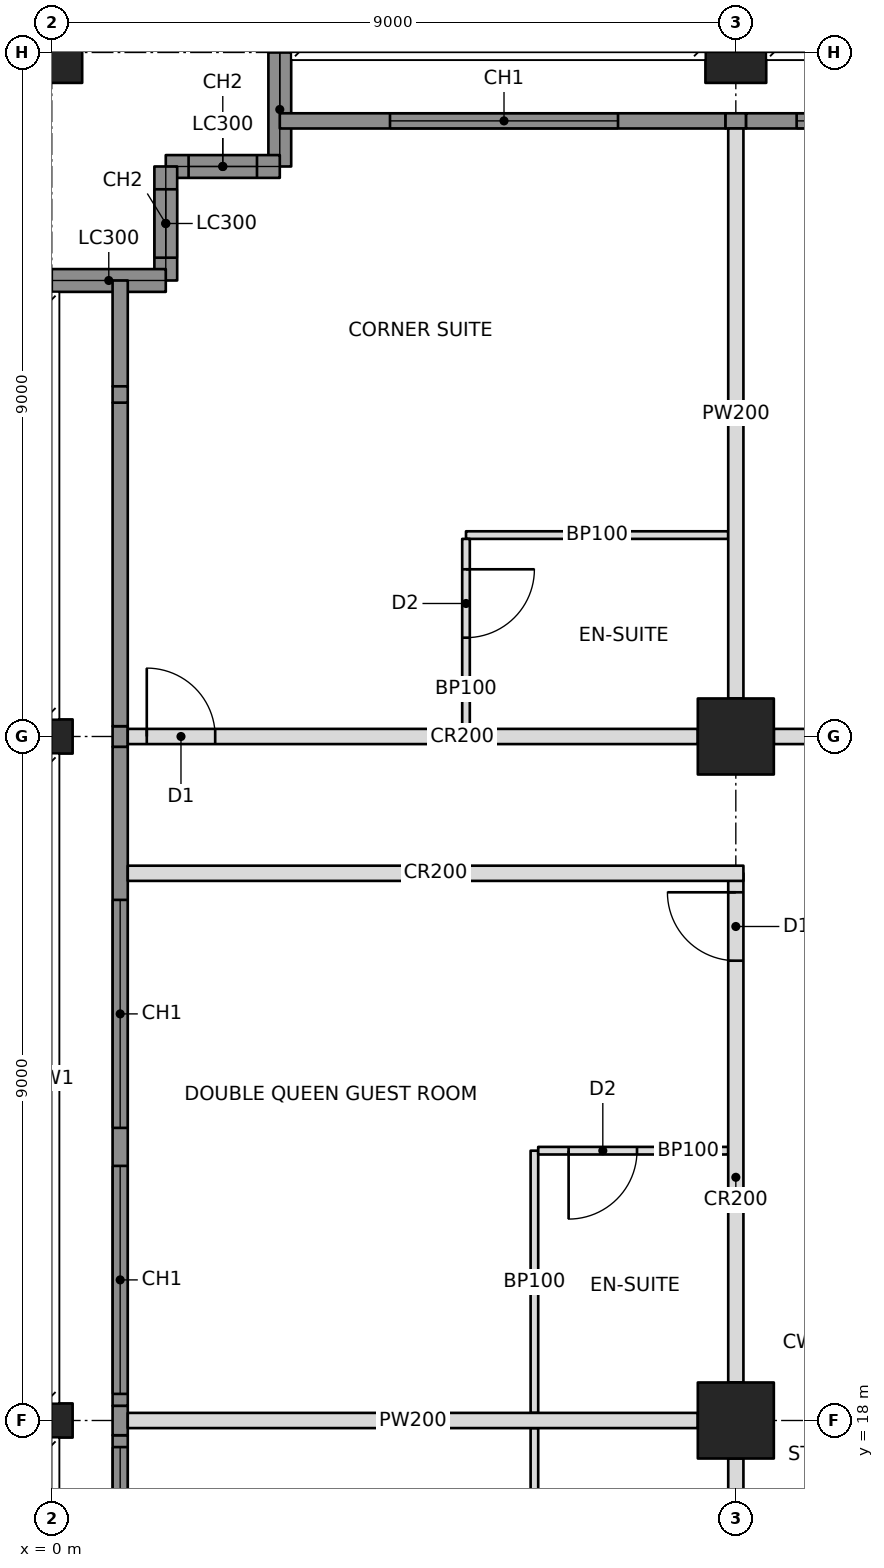
"""IFC4 building model, lengths in metres.
Left out: names, types, materials, properties, quantities, classifications, styles, units other than length and angle.
Written with IfcOpenShell. Run it as: python <this file> out.ifc"""

import sys

from ifc_helpers import new_model, si_unit, direction, frame, frame_2d, origin, origin_2d, place, context, subcontext, project, spatial, rectangle, hollow_rectangle, i_section, extrude, element, fill, save


model = new_model("IFC4")
c1 = context("Model", 3, precision=1e-05, world=origin(), true_north=direction((0.0, 1.0)))
c2 = subcontext(c1, "Body", "Model", "MODEL_VIEW")
j1 = project(units=[si_unit("LENGTHUNIT", "METRE"), si_unit("PLANEANGLEUNIT", "RADIAN")], contexts=[c1])
p1 = place(None, origin())
s1 = spatial("IfcSite", under=j1, at=p1, CompositionType="ELEMENT")
p2 = place(p1, origin())
s2 = spatial("IfcBuilding", under=s1, at=p2, CompositionType="ELEMENT")
p3 = place(p2, frame((0.0, 0.0, 94.2)))
s3 = spatial("IfcBuildingStorey", under=s2, at=p3, CompositionType="ELEMENT", Elevation=94.2)
for number, where, z_axis, x_axis in (
    (1, (0.0, 18.0, 0.0), (0.0, 0.0, 1.0), (0.0, 1.0, 0.0)),
    (2, (0.0, 27.0, 0.0), (0.0, 0.0, 1.0), (0.0, 1.0, 0.0)),
):
    element("IfcColumn", number, at=place(p3, frame(where, z_axis=z_axis, x_axis=x_axis)), inside=s3, PredefinedType="COLUMN", context=c2, shape_type="SweptSolid", body=[
        extrude(i_section(OverallWidth=0.449, OverallDepth=0.549, WebThickness=0.072, FlangeThickness=0.115, at=origin_2d()), origin(), (0.0, 0.0, 1.0), 3.4),
    ])
p4 = place(p3, frame((0.0, 36.0, 0.0), z_axis=(0.0, 0.0, 1.0), x_axis=(1.0, 0.0, 0.0)))
e3 = element("IfcColumn", 3, at=p4, inside=s3, PredefinedType="COLUMN", context=c2, shape_type="SweptSolid", body=[
    extrude(hollow_rectangle(XDim=0.8, YDim=0.8, WallThickness=0.07, at=origin_2d()), origin(), (0.0, 0.0, 1.0), 3.4),
])
for number, where, z_axis, x_axis in (
    (4, (9.0, 18.0, 0.0), (0.0, 0.0, 1.0), (1.0, 0.0, 0.0)),
    (5, (9.0, 27.0, 0.0), (0.0, 0.0, 1.0), (1.0, 0.0, 0.0)),
):
    element("IfcColumn", number, at=place(p3, frame(where, z_axis=z_axis, x_axis=x_axis)), inside=s3, PredefinedType="COLUMN", context=c2, shape_type="SweptSolid", body=[
        extrude(hollow_rectangle(XDim=1.0, YDim=1.0, WallThickness=0.1, at=origin_2d()), origin(), (0.0, 0.0, 1.0), 3.4),
    ])
p5 = place(p3, frame((9.0, 36.0, 0.0), z_axis=(0.0, 0.0, 1.0), x_axis=(1.0, 0.0, 0.0)))
e6 = element("IfcColumn", 6, at=p5, inside=s3, PredefinedType="COLUMN", context=c2, shape_type="SweptSolid", body=[
    extrude(hollow_rectangle(XDim=0.8, YDim=0.8, WallThickness=0.07, at=origin_2d()), origin(), (0.0, 0.0, 1.0), 3.4),
])
p6 = place(p3, frame((3.0, 36.0, 0.0), z_axis=(0.0, 0.0, 1.0), x_axis=(0.0, -1.0, 0.0)))
e7 = element("IfcWall", 7, at=p6, inside=s3, PredefinedType="SOLIDWALL", context=c2, shape_type="SweptSolid", body=[
    extrude(rectangle(XDim=1.5, YDim=0.3, at=frame_2d((0.75, 0.0))), origin(), (0.0, 0.0, 1.0), 2.42),
])
p7 = place(p3, frame((3.0, 34.5, 0.0), z_axis=(0.0, 0.0, 1.0), x_axis=(-1.0, 0.0, 0.0)))
e8 = element("IfcWall", 8, at=p7, inside=s3, PredefinedType="SOLIDWALL", context=c2, shape_type="SweptSolid", body=[
    extrude(rectangle(XDim=1.5, YDim=0.3, at=frame_2d((0.75, 0.0))), origin(), (0.0, 0.0, 1.0), 3.2),
])
p8 = place(p7, frame((0.3, 0.0, 0.6)))
e9 = element("IfcOpeningElement", 9, at=p8, cuts=e8, PredefinedType="OPENING", context=c2, shape_type="SweptSolid", body=[
    extrude(rectangle(XDim=0.9, YDim=2.2, at=frame_2d((0.45, 1.1))), frame((0.0, 0.16, 0.0), z_axis=(0.0, -1.0, 0.0), x_axis=(1.0, 0.0, 0.0)), (0.0, 0.0, 1.0), 0.32),
])
p9 = place(p3, frame((1.5, 34.5, 0.0), z_axis=(0.0, 0.0, 1.0), x_axis=(0.0, -1.0, 0.0)))
e10 = element("IfcWall", 10, at=p9, inside=s3, PredefinedType="SOLIDWALL", context=c2, shape_type="SweptSolid", body=[
    extrude(rectangle(XDim=1.5, YDim=0.3, at=frame_2d((0.75, 0.0))), origin(), (0.0, 0.0, 1.0), 3.2),
])
p10 = place(p9, frame((0.3, 0.0, 0.6)))
e11 = element("IfcOpeningElement", 11, at=p10, cuts=e10, PredefinedType="OPENING", context=c2, shape_type="SweptSolid", body=[
    extrude(rectangle(XDim=0.9, YDim=2.2, at=frame_2d((0.45, 1.1))), frame((0.0, 0.16, 0.0), z_axis=(0.0, -1.0, 0.0), x_axis=(1.0, 0.0, 0.0)), (0.0, 0.0, 1.0), 0.32),
])
p11 = place(p3, frame((1.5, 33.0, 0.0), z_axis=(0.0, 0.0, 1.0), x_axis=(-1.0, 0.0, 0.0)))
e12 = element("IfcWall", 12, at=p11, inside=s3, PredefinedType="SOLIDWALL", context=c2, shape_type="SweptSolid", body=[
    extrude(rectangle(XDim=1.5, YDim=0.3, at=frame_2d((0.75, 0.0))), origin(), (0.0, 0.0, 1.0), 2.42),
])
p12 = place(p3, frame((3.0, 35.1, 0.0), z_axis=(0.0, 0.0, 1.0), x_axis=(1.0, 0.0, 0.0)))
e13 = element("IfcWall", 13, at=p12, inside=s3, PredefinedType="SOLIDWALL", context=c2, shape_type="SweptSolid", body=[
    extrude(rectangle(XDim=5.865, YDim=0.2, at=frame_2d((2.932, 0.0))), origin(), (0.0, 0.0, 1.0), 3.2),
])
p13 = place(p12, frame((1.45, 0.0, 0.6)))
e14 = element("IfcOpeningElement", 14, at=p13, cuts=e13, PredefinedType="OPENING", context=c2, shape_type="SweptSolid", body=[
    extrude(rectangle(XDim=3.0, YDim=2.2, at=frame_2d((1.5, 1.1))), frame((0.0, 0.11, 0.0), z_axis=(0.0, -1.0, 0.0), x_axis=(1.0, 0.0, 0.0)), (0.0, 0.0, 1.0), 0.22),
])
p14 = place(p3, frame((1.0, 27.0, 0.0), z_axis=(0.0, 0.0, 1.0), x_axis=(1.0, 0.0, 0.0)))
e15 = element("IfcWall", 15, at=p14, inside=s3, PredefinedType="PARTITIONING", context=c2, shape_type="SweptSolid", body=[
    extrude(rectangle(XDim=7.5, YDim=0.2, at=frame_2d((3.75, 0.0))), origin(), (0.0, 0.0, 1.0), 2.438),
])
p15 = place(p14, frame((0.25, 0.0, 0.0)))
e16 = element("IfcOpeningElement", 16, at=p15, cuts=e15, PredefinedType="OPENING", context=c2, shape_type="SweptSolid", body=[
    extrude(rectangle(XDim=0.9, YDim=2.1, at=frame_2d((0.45, 1.05))), frame((0.0, 0.11, 0.0), z_axis=(0.0, -1.0, 0.0), x_axis=(1.0, 0.0, 0.0)), (0.0, 0.0, 1.0), 0.22),
])
p16 = place(p3, frame((9.5, 27.0, 0.0), z_axis=(0.0, 0.0, 1.0), x_axis=(1.0, 0.0, 0.0)))
e17 = element("IfcWall", 17, at=p16, inside=s3, PredefinedType="PARTITIONING", context=c2, shape_type="SweptSolid", body=[
    extrude(rectangle(XDim=2.85, YDim=0.2, at=frame_2d((1.425, 0.0))), origin(), (0.0, 0.0, 1.0), 2.405),
])
p17 = place(p3, frame((9.0, 10.8, 0.0), z_axis=(0.0, 0.0, 1.0), x_axis=(0.0, 1.0, 0.0)))
e18 = element("IfcWall", 18, at=p17, inside=s3, PredefinedType="PARTITIONING", context=c2, shape_type="SweptSolid", body=[
    extrude(rectangle(XDim=6.7, YDim=0.2, at=frame_2d((3.35, 0.0))), origin(), (0.0, 0.0, 1.0), 2.405),
])
p18 = place(p17, frame((0.25, 0.0, 0.0)))
e19 = element("IfcOpeningElement", 19, at=p18, cuts=e18, PredefinedType="OPENING", context=c2, shape_type="SweptSolid", body=[
    extrude(rectangle(XDim=0.9, YDim=2.1, at=frame_2d((0.45, 1.05))), frame((0.0, 0.11, 0.0), z_axis=(0.0, -1.0, 0.0), x_axis=(1.0, 0.0, 0.0)), (0.0, 0.0, 1.0), 0.22),
])
p19 = place(p3, frame((9.0, 18.5, 0.0), z_axis=(0.0, 0.0, 1.0), x_axis=(0.0, 1.0, 0.0)))
e20 = element("IfcWall", 20, at=p19, inside=s3, PredefinedType="PARTITIONING", context=c2, shape_type="SweptSolid", body=[
    extrude(rectangle(XDim=6.7, YDim=0.2, at=frame_2d((3.35, 0.0))), origin(), (0.0, 0.0, 1.0), 2.405),
])
p20 = place(p19, frame((5.55, 0.0, 0.0)))
e21 = element("IfcOpeningElement", 21, at=p20, cuts=e20, PredefinedType="OPENING", context=c2, shape_type="SweptSolid", body=[
    extrude(rectangle(XDim=0.9, YDim=2.1, at=frame_2d((0.45, 1.05))), frame((0.0, 0.11, 0.0), z_axis=(0.0, -1.0, 0.0), x_axis=(1.0, 0.0, 0.0)), (0.0, 0.0, 1.0), 0.22),
])
p21 = place(p3, frame((1.0, 25.2, 0.0), z_axis=(0.0, 0.0, 1.0), x_axis=(1.0, 0.0, 0.0)))
e22 = element("IfcWall", 22, at=p21, inside=s3, PredefinedType="PARTITIONING", context=c2, shape_type="SweptSolid", body=[
    extrude(rectangle(XDim=8.1, YDim=0.2, at=frame_2d((4.05, 0.0))), origin(), (0.0, 0.0, 1.0), 2.404),
])
p22 = place(p3, frame((9.0, 27.5, 0.0), z_axis=(0.0, 0.0, 1.0), x_axis=(0.0, 1.0, 0.0)))
e23 = element("IfcWall", 23, at=p22, inside=s3, PredefinedType="PARTITIONING", context=c2, shape_type="SweptSolid", body=[
    extrude(rectangle(XDim=7.5, YDim=0.2, at=frame_2d((3.75, 0.0))), origin(), (0.0, 0.0, 1.0), 2.438),
])
p23 = place(p3, frame((5.45, 29.65, 0.0), z_axis=(0.0, 0.0, 1.0), x_axis=(1.0, 0.0, 0.0)))
e24 = element("IfcWall", 24, at=p23, inside=s3, PredefinedType="PARTITIONING", context=c2, shape_type="SweptSolid", body=[
    extrude(rectangle(XDim=3.45, YDim=0.1, at=frame_2d((1.725, 0.0))), origin(), (0.0, 0.0, 1.0), 2.438),
])
p24 = place(p3, frame((5.45, 27.1, 0.0), z_axis=(0.0, 0.0, 1.0), x_axis=(0.0, 1.0, 0.0)))
e25 = element("IfcWall", 25, at=p24, inside=s3, PredefinedType="PARTITIONING", context=c2, shape_type="SweptSolid", body=[
    extrude(rectangle(XDim=2.5, YDim=0.1, at=frame_2d((1.25, 0.0))), origin(), (0.0, 0.0, 1.0), 2.438),
])
p25 = place(p24, frame((1.2, 0.0, 0.0)))
e26 = element("IfcOpeningElement", 26, at=p25, cuts=e25, PredefinedType="OPENING", context=c2, shape_type="SweptSolid", body=[
    extrude(rectangle(XDim=0.9, YDim=2.1, at=frame_2d((0.45, 1.05))), frame((0.0, 0.06, 0.0), z_axis=(0.0, -1.0, 0.0), x_axis=(1.0, 0.0, 0.0)), (0.0, 0.0, 1.0), 0.12),
])
p26 = place(p3, frame((8.5, 18.0, 0.0), z_axis=(0.0, 0.0, 1.0), x_axis=(-1.0, 0.0, 0.0)))
e27 = element("IfcWall", 27, at=p26, inside=s3, PredefinedType="PARTITIONING", context=c2, shape_type="SweptSolid", body=[
    extrude(rectangle(XDim=7.5, YDim=0.2, at=frame_2d((3.75, 0.0))), origin(), (0.0, 0.0, 1.0), 2.405),
])
for number, where, z_axis, x_axis in (
    (28, (6.35, 14.45, 0.0), (0.0, 0.0, 1.0), (0.0, 1.0, 0.0)),
    (29, (6.35, 18.1, 0.0), (0.0, 0.0, 1.0), (0.0, 1.0, 0.0)),
):
    element("IfcWall", number, at=place(p3, frame(where, z_axis=z_axis, x_axis=x_axis)), inside=s3, PredefinedType="PARTITIONING", context=c2, shape_type="SweptSolid", body=[
        extrude(rectangle(XDim=3.45, YDim=0.1, at=frame_2d((1.725, 0.0))), origin(), (0.0, 0.0, 1.0), 2.404),
    ])
p27 = place(p3, frame((8.9, 21.55, 0.0), z_axis=(0.0, 0.0, 1.0), x_axis=(-1.0, 0.0, 0.0)))
e30 = element("IfcWall", 30, at=p27, inside=s3, PredefinedType="PARTITIONING", context=c2, shape_type="SweptSolid", body=[
    extrude(rectangle(XDim=2.5, YDim=0.1, at=frame_2d((1.25, 0.0))), origin(), (0.0, 0.0, 1.0), 2.404),
])
p28 = place(p27, frame((1.2, 0.0, 0.0)))
e31 = element("IfcOpeningElement", 31, at=p28, cuts=e30, PredefinedType="OPENING", context=c2, shape_type="SweptSolid", body=[
    extrude(rectangle(XDim=0.9, YDim=2.1, at=frame_2d((0.45, 1.05))), frame((0.0, 0.06, 0.0), z_axis=(0.0, -1.0, 0.0), x_axis=(1.0, 0.0, 0.0)), (0.0, 0.0, 1.0), 0.12),
])
p29 = place(p3, frame((0.9, 9.135, 0.0), z_axis=(0.0, 0.0, 1.0), x_axis=(0.0, 1.0, 0.0)))
e32 = element("IfcWall", 32, at=p29, inside=s3, PredefinedType="SOLIDWALL", context=c2, shape_type="SweptSolid", body=[
    extrude(rectangle(XDim=8.671, YDim=0.2, at=frame_2d((4.335, 0.0))), origin(), (0.0, 0.0, 1.0), 3.2),
])
p30 = place(p29, frame((2.015, 0.0, 0.6)))
e33 = element("IfcOpeningElement", 33, at=p30, cuts=e32, PredefinedType="OPENING", context=c2, shape_type="SweptSolid", body=[
    extrude(rectangle(XDim=3.0, YDim=2.2, at=frame_2d((1.5, 1.1))), frame((0.0, 0.11, 0.0), z_axis=(0.0, -1.0, 0.0), x_axis=(1.0, 0.0, 0.0)), (0.0, 0.0, 1.0), 0.22),
])
p31 = place(p29, frame((5.515, 0.0, 0.6)))
e34 = element("IfcOpeningElement", 34, at=p31, cuts=e32, PredefinedType="OPENING", context=c2, shape_type="SweptSolid", body=[
    extrude(rectangle(XDim=3.0, YDim=2.2, at=frame_2d((1.5, 1.1))), frame((0.0, 0.11, 0.0), z_axis=(0.0, -1.0, 0.0), x_axis=(1.0, 0.0, 0.0)), (0.0, 0.0, 1.0), 0.22),
])
p32 = place(p3, frame((0.9, 17.806, 0.0), z_axis=(0.0, 0.0, 1.0), x_axis=(0.0, 1.0, 0.0)))
e35 = element("IfcWall", 35, at=p32, inside=s3, PredefinedType="SOLIDWALL", context=c2, shape_type="SweptSolid", body=[
    extrude(rectangle(XDim=0.388, YDim=0.2, at=frame_2d((0.194, 0.0))), origin(), (0.0, 0.0, 1.0), 2.404),
])
p33 = place(p3, frame((0.9, 18.194, 0.0), z_axis=(0.0, 0.0, 1.0), x_axis=(0.0, 1.0, 0.0)))
e36 = element("IfcWall", 36, at=p33, inside=s3, PredefinedType="SOLIDWALL", context=c2, shape_type="SweptSolid", body=[
    extrude(rectangle(XDim=8.671, YDim=0.2, at=frame_2d((4.335, 0.0))), origin(), (0.0, 0.0, 1.0), 3.2),
])
p34 = place(p33, frame((0.156, 0.0, 0.6)))
e37 = element("IfcOpeningElement", 37, at=p34, cuts=e36, PredefinedType="OPENING", context=c2, shape_type="SweptSolid", body=[
    extrude(rectangle(XDim=3.0, YDim=2.2, at=frame_2d((1.5, 1.1))), frame((0.0, 0.11, 0.0), z_axis=(0.0, -1.0, 0.0), x_axis=(1.0, 0.0, 0.0)), (0.0, 0.0, 1.0), 0.22),
])
p35 = place(p33, frame((3.656, 0.0, 0.6)))
e38 = element("IfcOpeningElement", 38, at=p35, cuts=e36, PredefinedType="OPENING", context=c2, shape_type="SweptSolid", body=[
    extrude(rectangle(XDim=3.0, YDim=2.2, at=frame_2d((1.5, 1.1))), frame((0.0, 0.11, 0.0), z_axis=(0.0, -1.0, 0.0), x_axis=(1.0, 0.0, 0.0)), (0.0, 0.0, 1.0), 0.22),
])
p36 = place(p3, frame((0.9, 26.865, 0.0), z_axis=(0.0, 0.0, 1.0), x_axis=(0.0, 1.0, 0.0)))
e39 = element("IfcWall", 39, at=p36, inside=s3, PredefinedType="SOLIDWALL", context=c2, shape_type="SweptSolid", body=[
    extrude(rectangle(XDim=0.271, YDim=0.2, at=frame_2d((0.135, 0.0))), origin(), (0.0, 0.0, 1.0), 2.438),
])
p37 = place(p3, frame((0.9, 27.135, 0.0), z_axis=(0.0, 0.0, 1.0), x_axis=(0.0, 1.0, 0.0)))
e40 = element("IfcWall", 40, at=p37, inside=s3, PredefinedType="SOLIDWALL", context=c2, shape_type="SweptSolid", body=[
    extrude(rectangle(XDim=4.257, YDim=0.2, at=frame_2d((2.129, 0.0))), origin(), (0.0, 0.0, 1.0), 3.2),
])
p38 = place(p3, frame((0.9, 31.393, 0.0), z_axis=(0.0, 0.0, 1.0), x_axis=(0.0, 1.0, 0.0)))
e41 = element("IfcWall", 41, at=p38, inside=s3, PredefinedType="SOLIDWALL", context=c2, shape_type="SweptSolid", body=[
    extrude(rectangle(XDim=0.215, YDim=0.2, at=frame_2d((0.107, 0.0))), origin(), (0.0, 0.0, 1.0), 2.661),
])
p39 = place(p3, frame((0.9, 31.607, 0.0), z_axis=(0.0, 0.0, 1.0), x_axis=(0.0, 1.0, 0.0)))
e42 = element("IfcWall", 42, at=p39, inside=s3, PredefinedType="SOLIDWALL", context=c2, shape_type="SweptSolid", body=[
    extrude(rectangle(XDim=1.393, YDim=0.2, at=frame_2d((0.696, 0.0))), origin(), (0.0, 0.0, 1.0), 3.2),
])
p40 = place(p3, frame((8.865, 35.1, 0.0), z_axis=(0.0, 0.0, 1.0), x_axis=(1.0, 0.0, 0.0)))
e43 = element("IfcWall", 43, at=p40, inside=s3, PredefinedType="SOLIDWALL", context=c2, shape_type="SweptSolid", body=[
    extrude(rectangle(XDim=0.271, YDim=0.2, at=frame_2d((0.135, 0.0))), origin(), (0.0, 0.0, 1.0), 2.438),
])
p41 = place(p3, frame((9.135, 35.1, 0.0), z_axis=(0.0, 0.0, 1.0), x_axis=(1.0, 0.0, 0.0)))
e44 = element("IfcWall", 44, at=p41, inside=s3, PredefinedType="SOLIDWALL", context=c2, shape_type="SweptSolid", body=[
    extrude(rectangle(XDim=8.671, YDim=0.2, at=frame_2d((4.335, 0.0))), origin(), (0.0, 0.0, 1.0), 3.2),
])
p42 = place(p41, frame((0.665, 0.0, 0.6)))
e45 = element("IfcOpeningElement", 45, at=p42, cuts=e44, PredefinedType="OPENING", context=c2, shape_type="SweptSolid", body=[
    extrude(rectangle(XDim=3.0, YDim=2.2, at=frame_2d((1.5, 1.1))), frame((0.0, 0.11, 0.0), z_axis=(0.0, -1.0, 0.0), x_axis=(1.0, 0.0, 0.0)), (0.0, 0.0, 1.0), 0.22),
])
p43 = place(p41, frame((5.065, 0.0, 0.6)))
e46 = element("IfcOpeningElement", 46, at=p43, cuts=e44, PredefinedType="OPENING", context=c2, shape_type="SweptSolid", body=[
    extrude(rectangle(XDim=3.0, YDim=2.2, at=frame_2d((1.5, 1.1))), frame((0.0, 0.11, 0.0), z_axis=(0.0, -1.0, 0.0), x_axis=(1.0, 0.0, 0.0)), (0.0, 0.0, 1.0), 0.22),
])
p44 = place(p8, origin())
e47 = element("IfcWindow", 47, at=p44, inside=s3, PartitioningType="SINGLE_PANEL", PredefinedType="WINDOW", context=c2, shape_type="SweptSolid", body=[
    extrude(rectangle(XDim=0.9, YDim=2.2, at=frame_2d((0.45, 1.1))), frame((0.0, 0.03, 0.0), z_axis=(0.0, -1.0, 0.0), x_axis=(1.0, 0.0, 0.0)), (0.0, 0.0, 1.0), 0.06),
])
fill(e9, e47)
p45 = place(p10, origin())
e48 = element("IfcWindow", 48, at=p45, inside=s3, PartitioningType="SINGLE_PANEL", PredefinedType="WINDOW", context=c2, shape_type="SweptSolid", body=[
    extrude(rectangle(XDim=0.9, YDim=2.2, at=frame_2d((0.45, 1.1))), frame((0.0, 0.03, 0.0), z_axis=(0.0, -1.0, 0.0), x_axis=(1.0, 0.0, 0.0)), (0.0, 0.0, 1.0), 0.06),
])
fill(e11, e48)
p46 = place(p13, origin())
e49 = element("IfcWindow", 49, at=p46, inside=s3, PartitioningType="TRIPLE_PANEL_VERTICAL", PredefinedType="WINDOW", context=c2, shape_type="SweptSolid", body=[
    extrude(rectangle(XDim=3.0, YDim=2.2, at=frame_2d((1.5, 1.1))), frame((0.0, 0.03, 0.0), z_axis=(0.0, -1.0, 0.0), x_axis=(1.0, 0.0, 0.0)), (0.0, 0.0, 1.0), 0.06),
])
fill(e14, e49)
p47 = place(p42, origin())
e50 = element("IfcWindow", 50, at=p47, inside=s3, PartitioningType="TRIPLE_PANEL_VERTICAL", PredefinedType="WINDOW", context=c2, shape_type="SweptSolid", body=[
    extrude(rectangle(XDim=3.0, YDim=2.2, at=frame_2d((1.5, 1.1))), frame((0.0, 0.03, 0.0), z_axis=(0.0, -1.0, 0.0), x_axis=(1.0, 0.0, 0.0)), (0.0, 0.0, 1.0), 0.06),
])
fill(e45, e50)
p48 = place(p31, origin())
e51 = element("IfcWindow", 51, at=p48, inside=s3, PartitioningType="TRIPLE_PANEL_VERTICAL", PredefinedType="WINDOW", context=c2, shape_type="SweptSolid", body=[
    extrude(rectangle(XDim=3.0, YDim=2.2, at=frame_2d((1.5, 1.1))), frame((0.0, 0.03, 0.0), z_axis=(0.0, -1.0, 0.0), x_axis=(1.0, 0.0, 0.0)), (0.0, 0.0, 1.0), 0.06),
])
fill(e34, e51)
p49 = place(p34, origin())
e52 = element("IfcWindow", 52, at=p49, inside=s3, PartitioningType="TRIPLE_PANEL_VERTICAL", PredefinedType="WINDOW", context=c2, shape_type="SweptSolid", body=[
    extrude(rectangle(XDim=3.0, YDim=2.2, at=frame_2d((1.5, 1.1))), frame((0.0, 0.03, 0.0), z_axis=(0.0, -1.0, 0.0), x_axis=(1.0, 0.0, 0.0)), (0.0, 0.0, 1.0), 0.06),
])
fill(e37, e52)
p50 = place(p35, origin())
e53 = element("IfcWindow", 53, at=p50, inside=s3, PartitioningType="TRIPLE_PANEL_VERTICAL", PredefinedType="WINDOW", context=c2, shape_type="SweptSolid", body=[
    extrude(rectangle(XDim=3.0, YDim=2.2, at=frame_2d((1.5, 1.1))), frame((0.0, 0.03, 0.0), z_axis=(0.0, -1.0, 0.0), x_axis=(1.0, 0.0, 0.0)), (0.0, 0.0, 1.0), 0.06),
])
fill(e38, e53)
p51 = place(p25, frame((0.9, 0.0, 0.0), z_axis=(0.0, 0.0, 1.0), x_axis=(-1.0, 0.0, 0.0)))
e54 = element("IfcDoor", 54, at=p51, inside=s3, OperationType="SINGLE_SWING_LEFT", PredefinedType="DOOR", context=c2, shape_type="SweptSolid", body=[
    extrude(rectangle(XDim=0.9, YDim=2.1, at=frame_2d((0.45, 1.05))), frame((0.0, 0.025, 0.0), z_axis=(0.0, -1.0, 0.0), x_axis=(1.0, 0.0, 0.0)), (0.0, 0.0, 1.0), 0.05),
])
fill(e26, e54)
p52 = place(p15, origin())
e55 = element("IfcDoor", 55, at=p52, inside=s3, OperationType="SINGLE_SWING_LEFT", PredefinedType="DOOR", context=c2, shape_type="SweptSolid", body=[
    extrude(rectangle(XDim=0.9, YDim=2.1, at=frame_2d((0.45, 1.05))), frame((0.0, 0.025, 0.0), z_axis=(0.0, -1.0, 0.0), x_axis=(1.0, 0.0, 0.0)), (0.0, 0.0, 1.0), 0.05),
])
fill(e16, e55)
p53 = place(p28, origin())
e56 = element("IfcDoor", 56, at=p53, inside=s3, OperationType="SINGLE_SWING_RIGHT", PredefinedType="DOOR", context=c2, shape_type="SweptSolid", body=[
    extrude(rectangle(XDim=0.9, YDim=2.1, at=frame_2d((0.45, 1.05))), frame((0.0, 0.025, 0.0), z_axis=(0.0, -1.0, 0.0), x_axis=(1.0, 0.0, 0.0)), (0.0, 0.0, 1.0), 0.05),
])
fill(e31, e56)
p54 = place(p20, origin())
e57 = element("IfcDoor", 57, at=p54, inside=s3, OperationType="SINGLE_SWING_RIGHT", PredefinedType="DOOR", context=c2, shape_type="SweptSolid", body=[
    extrude(rectangle(XDim=0.9, YDim=2.1, at=frame_2d((0.45, 1.05))), frame((0.0, 0.025, 0.0), z_axis=(0.0, -1.0, 0.0), x_axis=(1.0, 0.0, 0.0)), (0.0, 0.0, 1.0), 0.05),
])
fill(e21, e57)
save(model, sys.argv[1])
